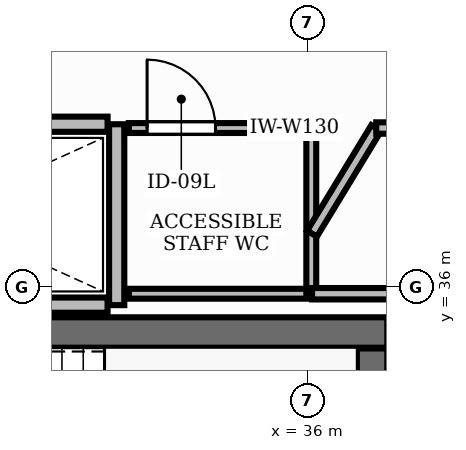
"""IFC4 building model, lengths in metres.
Left out: names, types, materials, properties, quantities, classifications, styles, units other than length and angle.
Written with IfcOpenShell. Run it as: python <this file> out.ifc"""

import sys

from ifc_helpers import new_model, si_unit, direction, frame, frame_2d, origin, place, context, subcontext, project, spatial, rectangle, extrude, element, fill, save


model = new_model("IFC4")
c1 = context("Model", 3, precision=1e-05, world=origin(), true_north=direction((0.0, 1.0)))
c2 = subcontext(c1, "Body", "Model", "MODEL_VIEW")
j1 = project(units=[si_unit("LENGTHUNIT", "METRE"), si_unit("PLANEANGLEUNIT", "RADIAN")], contexts=[c1])
p1 = place(None, origin())
s1 = spatial("IfcSite", under=j1, at=p1, CompositionType="ELEMENT")
p2 = place(p1, origin())
s2 = spatial("IfcBuilding", under=s1, at=p2, CompositionType="ELEMENT")
p3 = place(p2, frame((0.0, 0.0, 264.6)))
s3 = spatial("IfcBuildingStorey", under=s2, at=p3, CompositionType="ELEMENT", Elevation=264.6)
p4 = place(p3, frame((28.852, 35.4, 0.0), z_axis=(0.0, 0.0, 1.0), x_axis=(1.0, 0.0, 0.0)))
e1 = element("IfcWall", 1, at=p4, inside=s3, PredefinedType="SHEAR", context=c2, shape_type="SweptSolid", body=[
    extrude(rectangle(XDim=8.198, YDim=0.4, at=frame_2d((4.099, 0.0))), origin(), (0.0, 0.0, 1.0), 3.9),
])
p5 = place(p3, frame((36.85, 32.11, 0.0), z_axis=(0.0, 0.0, 1.0), x_axis=(0.0, 1.0, 0.0)))
e2 = element("IfcWall", 2, at=p5, inside=s3, PredefinedType="SHEAR", context=c2, shape_type="SweptSolid", body=[
    extrude(rectangle(XDim=3.08, YDim=0.4, at=frame_2d((1.54, 0.0))), origin(), (0.0, 0.0, 1.0), 3.9),
])
p6 = place(p3, frame((33.49, 35.76, 0.0), z_axis=(0.0, 0.0, 1.0), x_axis=(0.0, 1.0, 0.0)))
e3 = element("IfcWall", 3, at=p6, inside=s3, PredefinedType="PARTITIONING", context=c2, shape_type="SweptSolid", body=[
    extrude(rectangle(XDim=2.38, YDim=0.2, at=frame_2d((1.19, 0.0))), origin(), (0.0, 0.0, 1.0), 2.91),
])
for number, where, z_axis, x_axis in (
    (4, (28.8, 35.76, 0.0), (0.0, 0.0, 1.0), (1.0, 0.0, 0.0)),
    (5, (28.8, 38.14, 0.0), (0.0, 0.0, 1.0), (1.0, 0.0, 0.0)),
):
    element("IfcWall", number, at=place(p3, frame(where, z_axis=z_axis, x_axis=x_axis)), inside=s3, PredefinedType="PARTITIONING", context=c2, shape_type="SweptSolid", body=[
        extrude(rectangle(XDim=4.57, YDim=0.2, at=frame_2d((2.285, 0.0))), origin(), (0.0, 0.0, 1.0), 2.91),
    ])
p7 = place(p3, frame((33.65, 38.09, 0.0), z_axis=(0.0, 0.0, 1.0), x_axis=(1.0, 0.0, 0.0)))
e6 = element("IfcWall", 6, at=p7, inside=s3, PredefinedType="PARTITIONING", context=c2, shape_type="SweptSolid", body=[
    extrude(rectangle(XDim=2.4, YDim=0.13, at=frame_2d((1.2, 0.0))), origin(), (0.0, 0.0, 1.0), 2.91),
])
p8 = place(p7, frame((0.24, 0.0, 0.0)))
e7 = element("IfcOpeningElement", 7, at=p8, cuts=e6, PredefinedType="OPENING", context=c2, shape_type="SweptSolid", body=[
    extrude(rectangle(XDim=0.9, YDim=2.15, at=frame_2d((0.45, 1.075))), frame((0.0, 0.08, 0.0), z_axis=(0.0, -1.0, 0.0), x_axis=(1.0, 0.0, 0.0)), (0.0, 0.0, 1.0), 0.16),
])
p9 = place(p3, frame((36.05, 35.91, 0.0), z_axis=(0.0, 0.0, 1.0), x_axis=(-1.0, 0.0, 0.0)))
e8 = element("IfcWall", 8, at=p9, inside=s3, PredefinedType="PARTITIONING", context=c2, shape_type="SweptSolid", body=[
    extrude(rectangle(XDim=2.4, YDim=0.13, at=frame_2d((1.2, 0.0))), origin(), (0.0, 0.0, 1.0), 2.91),
])
p10 = place(p3, frame((36.05, 38.09, 0.0), z_axis=(0.0, 0.0, 1.0), x_axis=(0.0, -1.0, 0.0)))
e9 = element("IfcWall", 9, at=p10, inside=s3, PredefinedType="PARTITIONING", context=c2, shape_type="SweptSolid", body=[
    extrude(rectangle(XDim=2.18, YDim=0.13, at=frame_2d((1.09, 0.0))), origin(), (0.0, 0.0, 1.0), 2.91),
])
p11 = place(p3, frame((37.35, 35.91, 0.0), z_axis=(0.0, 0.0, 1.0), x_axis=(-1.0, 0.0, 0.0)))
e10 = element("IfcWall", 10, at=p11, inside=s3, PredefinedType="PARTITIONING", context=c2, shape_type="SweptSolid", body=[
    extrude(rectangle(XDim=1.29, YDim=0.15, at=frame_2d((0.645, 0.0))), origin(), (0.0, 0.0, 1.0), 2.91),
])
p12 = place(p3, frame((36.06, 36.701, 0.0), z_axis=(0.0, 0.0, 1.0), x_axis=(0.519499134934, 0.854470975986, 0.0)))
e11 = element("IfcWall", 11, at=p12, inside=s3, PredefinedType="PARTITIONING", context=c2, shape_type="SweptSolid", body=[
    extrude(rectangle(XDim=1.626, YDim=0.15, at=frame_2d((0.813, 0.0))), origin(), (0.0, 0.0, 1.0), 2.91),
])
p13 = place(p3, frame((36.905, 38.09, 0.0), z_axis=(0.0, 0.0, 1.0), x_axis=(1.0, 0.0, 0.0)))
e12 = element("IfcWall", 12, at=p13, inside=s3, PredefinedType="PARTITIONING", context=c2, shape_type="SweptSolid", body=[
    extrude(rectangle(XDim=0.295, YDim=0.15, at=frame_2d((0.147, 0.0))), origin(), (0.0, 0.0, 1.0), 2.91),
])
p14 = place(p8, origin())
e13 = element("IfcDoor", 13, at=p14, inside=s3, OperationType="SINGLE_SWING_LEFT", PredefinedType="DOOR", context=c2, shape_type="SweptSolid", body=[
    extrude(rectangle(XDim=0.9, YDim=2.15, at=frame_2d((0.45, 1.075))), frame((0.0, 0.025, 0.0), z_axis=(0.0, -1.0, 0.0), x_axis=(1.0, 0.0, 0.0)), (0.0, 0.0, 1.0), 0.05),
])
fill(e7, e13)
save(model, sys.argv[1])
